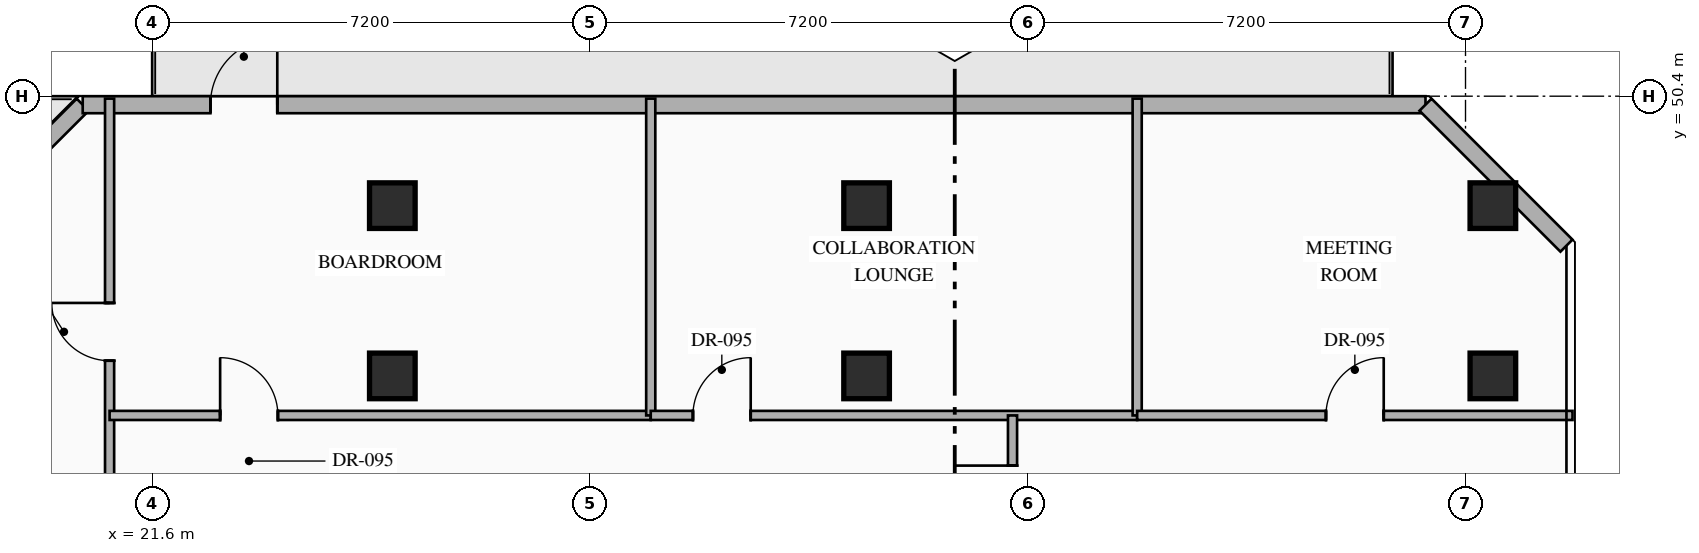
"""IFC4 building model, lengths in metres.
Left out: names, types, materials, properties, quantities, classifications, styles, units other than length and angle.
Written with IfcOpenShell. Run it as: python <this file> out.ifc"""

import sys

from ifc_helpers import new_model, si_unit, direction, frame, frame_2d, origin, origin_2d, place, context, subcontext, project, spatial, rectangle, hollow_rectangle, extrude, element, fill, save


model = new_model("IFC4")
c1 = context("Model", 3, precision=1e-05, world=origin(), true_north=direction((0.0, 1.0)))
c2 = subcontext(c1, "Body", "Model", "MODEL_VIEW")
j1 = project(units=[si_unit("LENGTHUNIT", "METRE"), si_unit("PLANEANGLEUNIT", "RADIAN")], contexts=[c1])
p1 = place(None, origin())
s1 = spatial("IfcSite", under=j1, at=p1, CompositionType="ELEMENT")
p2 = place(p1, origin())
s2 = spatial("IfcBuilding", under=s1, at=p2, CompositionType="ELEMENT")
p3 = place(p2, frame((0.0, 0.0, 186.75)))
s3 = spatial("IfcBuildingStorey", under=s2, at=p3, CompositionType="ELEMENT", Elevation=186.75)
for number, where, z_axis, x_axis in (
    (1, (25.55, 45.8, 0.0), (0.0, 0.0, 1.0), (1.0, 0.0, 0.0)),
    (2, (33.35, 45.8, 0.0), (0.0, 0.0, 1.0), (1.0, 0.0, 0.0)),
    (3, (43.65, 45.8, 0.0), (0.0, 0.0, 1.0), (1.0, 0.0, 0.0)),
    (4, (25.55, 48.6, 0.0), (0.0, 0.0, 1.0), (1.0, 0.0, 0.0)),
    (5, (33.35, 48.6, 0.0), (0.0, 0.0, 1.0), (1.0, 0.0, 0.0)),
    (6, (43.65, 48.6, 0.0), (0.0, 0.0, 1.0), (1.0, 0.0, 0.0)),
):
    element("IfcColumn", number, at=place(p3, frame(where, z_axis=z_axis, x_axis=x_axis)), inside=s3, PredefinedType="COLUMN", context=c2, shape_type="SweptSolid", body=[
        extrude(hollow_rectangle(XDim=0.75, YDim=0.75, WallThickness=0.028, at=origin_2d()), origin(), (0.0, 0.0, 1.0), 4.8),
    ])
p4 = place(p3, frame((18.14, 47.942, 0.0), z_axis=(0.0, 0.0, 1.0), x_axis=(0.707106781187, 0.707106781187, 0.0)))
e7 = element("IfcWall", 7, at=p4, inside=s3, PredefinedType="STANDARD", context=c2, shape_type="SweptSolid", body=[
    extrude(rectangle(XDim=3.278, YDim=0.28, at=frame_2d((1.639, 0.0))), origin(), (0.0, 0.0, 1.0), 4.55),
])
p5 = place(p3, frame((20.458, 50.26, 0.0), z_axis=(0.0, 0.0, 1.0), x_axis=(1.0, 0.0, 0.0)))
e8 = element("IfcWall", 8, at=p5, inside=s3, PredefinedType="STANDARD", context=c2, shape_type="SweptSolid", body=[
    extrude(rectangle(XDim=22.084, YDim=0.28, at=frame_2d((11.042, 0.0))), origin(), (0.0, 0.0, 1.0), 4.55),
])
p6 = place(p5, frame((2.1, 0.0, 0.0)))
e9 = element("IfcOpeningElement", 9, at=p6, cuts=e8, PredefinedType="OPENING", context=c2, shape_type="SweptSolid", body=[
    extrude(rectangle(XDim=1.1, YDim=2.2, at=frame_2d((0.55, 1.1))), frame((0.0, 0.15, 0.0), z_axis=(0.0, -1.0, 0.0), x_axis=(1.0, 0.0, 0.0)), (0.0, 0.0, 1.0), 0.3),
])
p7 = place(p3, frame((42.542, 50.26, 0.0), z_axis=(0.0, 0.0, 1.0), x_axis=(0.707106781187, -0.707106781187, 0.0)))
e10 = element("IfcWall", 10, at=p7, inside=s3, PredefinedType="STANDARD", context=c2, shape_type="SweptSolid", body=[
    extrude(rectangle(XDim=3.278, YDim=0.28, at=frame_2d((1.639, 0.0))), origin(), (0.0, 0.0, 1.0), 4.55),
])
p8 = place(p3, frame((20.9, 41.2, 0.0), z_axis=(0.0, 0.0, 1.0), x_axis=(0.0, 1.0, 0.0)))
e11 = element("IfcWall", 11, at=p8, inside=s3, PredefinedType="PARTITIONING", context=c2, shape_type="SweptSolid", body=[
    extrude(rectangle(XDim=9.16, YDim=0.15, at=frame_2d((4.58, 0.0))), origin(), (0.0, 0.0, 1.0), 4.55),
])
p9 = place(p8, frame((4.85, 0.0, 0.0)))
e12 = element("IfcOpeningElement", 12, at=p9, cuts=e11, PredefinedType="OPENING", context=c2, shape_type="SweptSolid", body=[
    extrude(rectangle(XDim=0.95, YDim=2.15, at=frame_2d((0.475, 1.075))), frame((0.0, 0.085, 0.0), z_axis=(0.0, -1.0, 0.0), x_axis=(1.0, 0.0, 0.0)), (0.0, 0.0, 1.0), 0.17),
])
p10 = place(p3, frame((20.9, 45.15, 0.0), z_axis=(0.0, 0.0, 1.0), x_axis=(1.0, 0.0, 0.0)))
e13 = element("IfcWall", 13, at=p10, inside=s3, PredefinedType="PARTITIONING", context=c2, shape_type="SweptSolid", body=[
    extrude(rectangle(XDim=8.9, YDim=0.15, at=frame_2d((4.45, 0.0))), origin(), (0.0, 0.0, 1.0), 4.55),
])
p11 = place(p10, frame((1.818, 0.0, 0.0)))
e14 = element("IfcOpeningElement", 14, at=p11, cuts=e13, PredefinedType="OPENING", context=c2, shape_type="SweptSolid", body=[
    extrude(rectangle(XDim=0.95, YDim=2.15, at=frame_2d((0.475, 1.075))), frame((0.0, 0.085, 0.0), z_axis=(0.0, -1.0, 0.0), x_axis=(1.0, 0.0, 0.0)), (0.0, 0.0, 1.0), 0.17),
])
p12 = place(p3, frame((29.8, 45.15, 0.0), z_axis=(0.0, 0.0, 1.0), x_axis=(0.0, 1.0, 0.0)))
e15 = element("IfcWall", 15, at=p12, inside=s3, PredefinedType="PARTITIONING", context=c2, shape_type="SweptSolid", body=[
    extrude(rectangle(XDim=5.21, YDim=0.15, at=frame_2d((2.605, 0.0))), origin(), (0.0, 0.0, 1.0), 4.55),
])
p13 = place(p3, frame((29.8, 45.15, 0.0), z_axis=(0.0, 0.0, 1.0), x_axis=(1.0, 0.0, 0.0)))
e16 = element("IfcWall", 16, at=p13, inside=s3, PredefinedType="PARTITIONING", context=c2, shape_type="SweptSolid", body=[
    extrude(rectangle(XDim=8.0, YDim=0.15, at=frame_2d((4.0, 0.0))), origin(), (0.0, 0.0, 1.0), 4.55),
])
p14 = place(p13, frame((0.694, 0.0, 0.0)))
e17 = element("IfcOpeningElement", 17, at=p14, cuts=e16, PredefinedType="OPENING", context=c2, shape_type="SweptSolid", body=[
    extrude(rectangle(XDim=0.95, YDim=2.15, at=frame_2d((0.475, 1.075))), frame((0.0, 0.085, 0.0), z_axis=(0.0, -1.0, 0.0), x_axis=(1.0, 0.0, 0.0)), (0.0, 0.0, 1.0), 0.17),
])
p15 = place(p3, frame((37.8, 45.15, 0.0), z_axis=(0.0, 0.0, 1.0), x_axis=(0.0, 1.0, 0.0)))
e18 = element("IfcWall", 18, at=p15, inside=s3, PredefinedType="PARTITIONING", context=c2, shape_type="SweptSolid", body=[
    extrude(rectangle(XDim=5.21, YDim=0.15, at=frame_2d((2.605, 0.0))), origin(), (0.0, 0.0, 1.0), 4.55),
])
p16 = place(p3, frame((37.8, 45.15, 0.0), z_axis=(0.0, 0.0, 1.0), x_axis=(1.0, 0.0, 0.0)))
e19 = element("IfcWall", 19, at=p16, inside=s3, PredefinedType="PARTITIONING", context=c2, shape_type="SweptSolid", body=[
    extrude(rectangle(XDim=7.16, YDim=0.15, at=frame_2d((3.58, 0.0))), origin(), (0.0, 0.0, 1.0), 4.55),
])
p17 = place(p16, frame((3.105, 0.0, 0.0)))
e20 = element("IfcOpeningElement", 20, at=p17, cuts=e19, PredefinedType="OPENING", context=c2, shape_type="SweptSolid", body=[
    extrude(rectangle(XDim=0.95, YDim=2.15, at=frame_2d((0.475, 1.075))), frame((0.0, 0.085, 0.0), z_axis=(0.0, -1.0, 0.0), x_axis=(1.0, 0.0, 0.0)), (0.0, 0.0, 1.0), 0.17),
])
p18 = place(p3, frame((35.75, 42.55, 0.0), z_axis=(0.0, 0.0, 1.0), x_axis=(0.0, 1.0, 0.0)))
e21 = element("IfcWall", 21, at=p18, inside=s3, PredefinedType="PARTITIONING", context=c2, shape_type="SweptSolid", body=[
    extrude(rectangle(XDim=2.6, YDim=0.15, at=frame_2d((1.3, 0.0))), origin(), (0.0, 0.0, 1.0), 4.55),
])
p19 = place(p18, frame((0.825, 0.0, 0.0)))
e22 = element("IfcOpeningElement", 22, at=p19, cuts=e21, PredefinedType="OPENING", context=c2, shape_type="SweptSolid", body=[
    extrude(rectangle(XDim=0.95, YDim=2.15, at=frame_2d((0.475, 1.075))), frame((0.0, 0.085, 0.0), z_axis=(0.0, -1.0, 0.0), x_axis=(1.0, 0.0, 0.0)), (0.0, 0.0, 1.0), 0.17),
])
p20 = place(p6, origin())
e23 = element("IfcDoor", 23, at=p20, inside=s3, OperationType="SINGLE_SWING_RIGHT", PredefinedType="DOOR", context=c2, shape_type="SweptSolid", body=[
    extrude(rectangle(XDim=1.1, YDim=2.2, at=frame_2d((0.55, 1.1))), frame((0.0, 0.025, 0.0), z_axis=(0.0, -1.0, 0.0), x_axis=(1.0, 0.0, 0.0)), (0.0, 0.0, 1.0), 0.05),
])
fill(e9, e23)
p21 = place(p9, origin())
e24 = element("IfcDoor", 24, at=p21, inside=s3, OperationType="SINGLE_SWING_RIGHT", PredefinedType="DOOR", context=c2, shape_type="SweptSolid", body=[
    extrude(rectangle(XDim=0.95, YDim=2.15, at=frame_2d((0.475, 1.075))), frame((0.0, 0.025, 0.0), z_axis=(0.0, -1.0, 0.0), x_axis=(1.0, 0.0, 0.0)), (0.0, 0.0, 1.0), 0.05),
])
fill(e12, e24)
p22 = place(p11, origin())
e25 = element("IfcDoor", 25, at=p22, inside=s3, OperationType="SINGLE_SWING_LEFT", PredefinedType="DOOR", context=c2, shape_type="SweptSolid", body=[
    extrude(rectangle(XDim=0.95, YDim=2.15, at=frame_2d((0.475, 1.075))), frame((0.0, 0.025, 0.0), z_axis=(0.0, -1.0, 0.0), x_axis=(1.0, 0.0, 0.0)), (0.0, 0.0, 1.0), 0.05),
])
fill(e14, e25)
p23 = place(p14, origin())
e26 = element("IfcDoor", 26, at=p23, inside=s3, OperationType="SINGLE_SWING_RIGHT", PredefinedType="DOOR", context=c2, shape_type="SweptSolid", body=[
    extrude(rectangle(XDim=0.95, YDim=2.15, at=frame_2d((0.475, 1.075))), frame((0.0, 0.025, 0.0), z_axis=(0.0, -1.0, 0.0), x_axis=(1.0, 0.0, 0.0)), (0.0, 0.0, 1.0), 0.05),
])
fill(e17, e26)
p24 = place(p17, origin())
e27 = element("IfcDoor", 27, at=p24, inside=s3, OperationType="SINGLE_SWING_RIGHT", PredefinedType="DOOR", context=c2, shape_type="SweptSolid", body=[
    extrude(rectangle(XDim=0.95, YDim=2.15, at=frame_2d((0.475, 1.075))), frame((0.0, 0.025, 0.0), z_axis=(0.0, -1.0, 0.0), x_axis=(1.0, 0.0, 0.0)), (0.0, 0.0, 1.0), 0.05),
])
fill(e20, e27)
p25 = place(p19, origin())
e28 = element("IfcDoor", 28, at=p25, inside=s3, OperationType="SINGLE_SWING_RIGHT", PredefinedType="DOOR", context=c2, shape_type="SweptSolid", body=[
    extrude(rectangle(XDim=0.95, YDim=2.15, at=frame_2d((0.475, 1.075))), frame((0.0, 0.025, 0.0), z_axis=(0.0, -1.0, 0.0), x_axis=(1.0, 0.0, 0.0)), (0.0, 0.0, 1.0), 0.05),
])
fill(e22, e28)
save(model, sys.argv[1])
